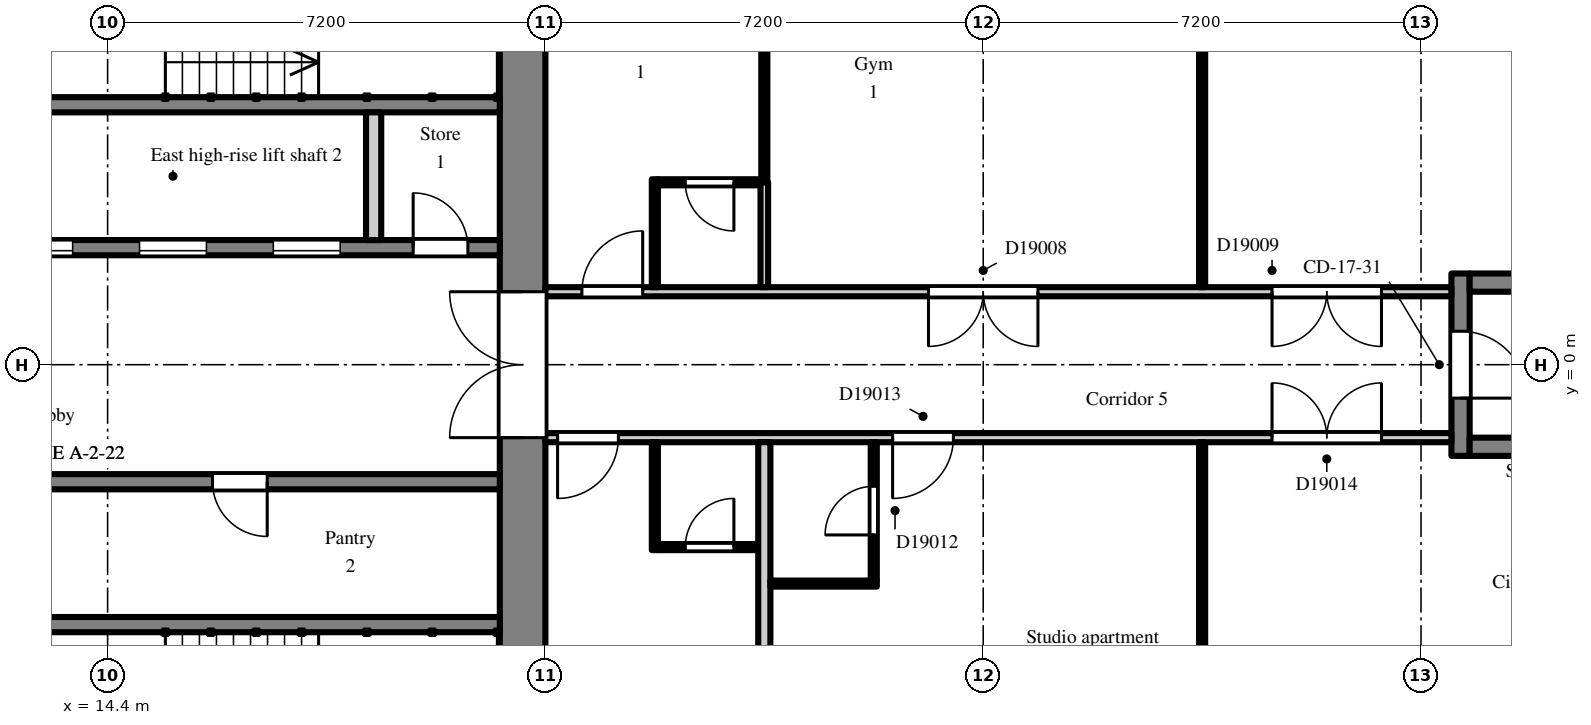
"""IFC4 building model, lengths in metres.
Left out: names, types, materials, properties, quantities, classifications, styles, units other than length and angle.
Written with IfcOpenShell. Run it as: python <this file> out.ifc"""

import sys

from ifc_helpers import new_model, si_unit, direction, frame, frame_2d, origin, place, context, subcontext, project, spatial, rectangle, extrude, element, fill, save


model = new_model("IFC4")
c1 = context("Model", 3, precision=1e-05, world=origin(), true_north=direction((0.0, 1.0)))
c2 = subcontext(c1, "Body", "Model", "MODEL_VIEW")
j1 = project(units=[si_unit("LENGTHUNIT", "METRE"), si_unit("PLANEANGLEUNIT", "RADIAN")], contexts=[c1])
p1 = place(None, origin())
s1 = spatial("IfcSite", under=j1, at=p1, CompositionType="ELEMENT")
p2 = place(p1, origin())
s2 = spatial("IfcBuilding", under=s1, at=p2, CompositionType="ELEMENT")
p3 = place(p2, frame((0.0, 0.0, 129.3)))
s3 = spatial("IfcBuildingStorey", under=s2, at=p3, CompositionType="ELEMENT", Elevation=129.3)
p4 = place(p3, frame((21.225, -7.2, 0.0), z_axis=(0.0, 0.0, 1.0), x_axis=(0.0, 1.0, 0.0)))
e1 = element("IfcWall", 1, at=p4, inside=s3, PredefinedType="SHEAR", context=c2, shape_type="SweptSolid", body=[
    extrude(rectangle(XDim=14.4, YDim=0.75, at=frame_2d((7.2, 0.0))), origin(), (0.0, 0.0, 1.0), 2.6),
])
p5 = place(p4, frame((6.0, 0.0, 0.0)))
e2 = element("IfcOpeningElement", 2, at=p5, cuts=e1, PredefinedType="OPENING", context=c2, shape_type="SweptSolid", body=[
    extrude(rectangle(XDim=2.4, YDim=2.2, at=frame_2d((1.2, 1.1))), frame((0.0, 0.385, 0.0), z_axis=(0.0, -1.0, 0.0), x_axis=(1.0, 0.0, 0.0)), (0.0, 0.0, 1.0), 0.77),
])
p6 = place(p3, frame((7.9, 1.925, 0.0), z_axis=(0.0, 0.0, 1.0), x_axis=(1.0, 0.0, 0.0)))
e3 = element("IfcWall", 3, at=p6, inside=s3, PredefinedType="SHEAR", context=c2, shape_type="SweptSolid", body=[
    extrude(rectangle(XDim=12.95, YDim=0.25, at=frame_2d((6.475, 0.0))), origin(), (0.0, 0.0, 1.0), 2.6),
])
p7 = place(p6, frame((4.825, 0.0, 0.0)))
e4 = element("IfcOpeningElement", 4, at=p7, cuts=e3, PredefinedType="OPENING", context=c2, shape_type="SweptSolid", body=[
    extrude(rectangle(XDim=1.1, YDim=2.1, at=frame_2d((0.55, 1.05))), frame((0.0, 0.135, 0.0), z_axis=(0.0, -1.0, 0.0), x_axis=(1.0, 0.0, 0.0)), (0.0, 0.0, 1.0), 0.27),
])
p8 = place(p6, frame((7.025, 0.0, 0.0)))
e5 = element("IfcOpeningElement", 5, at=p8, cuts=e3, PredefinedType="OPENING", context=c2, shape_type="SweptSolid", body=[
    extrude(rectangle(XDim=1.1, YDim=2.1, at=frame_2d((0.55, 1.05))), frame((0.0, 0.135, 0.0), z_axis=(0.0, -1.0, 0.0), x_axis=(1.0, 0.0, 0.0)), (0.0, 0.0, 1.0), 0.27),
])
p9 = place(p6, frame((9.225, 0.0, 0.0)))
e6 = element("IfcOpeningElement", 6, at=p9, cuts=e3, PredefinedType="OPENING", context=c2, shape_type="SweptSolid", body=[
    extrude(rectangle(XDim=1.1, YDim=2.1, at=frame_2d((0.55, 1.05))), frame((0.0, 0.135, 0.0), z_axis=(0.0, -1.0, 0.0), x_axis=(1.0, 0.0, 0.0)), (0.0, 0.0, 1.0), 0.27),
])
p10 = place(p6, frame((0.525, 0.0, 0.0)))
e7 = element("IfcOpeningElement", 7, at=p10, cuts=e3, PredefinedType="OPENING", context=c2, shape_type="SweptSolid", body=[
    extrude(rectangle(XDim=0.9, YDim=2.1, at=frame_2d((0.45, 1.05))), frame((0.0, 0.135, 0.0), z_axis=(0.0, -1.0, 0.0), x_axis=(1.0, 0.0, 0.0)), (0.0, 0.0, 1.0), 0.27),
])
p11 = place(p6, frame((2.625, 0.0, 0.0)))
e8 = element("IfcOpeningElement", 8, at=p11, cuts=e3, PredefinedType="OPENING", context=c2, shape_type="SweptSolid", body=[
    extrude(rectangle(XDim=1.1, YDim=2.1, at=frame_2d((0.55, 1.05))), frame((0.0, 0.135, 0.0), z_axis=(0.0, -1.0, 0.0), x_axis=(1.0, 0.0, 0.0)), (0.0, 0.0, 1.0), 0.27),
])
p12 = place(p6, frame((11.525, 0.0, 0.0)))
e9 = element("IfcOpeningElement", 9, at=p12, cuts=e3, PredefinedType="OPENING", context=c2, shape_type="SweptSolid", body=[
    extrude(rectangle(XDim=0.9, YDim=2.1, at=frame_2d((0.45, 1.05))), frame((0.0, 0.135, 0.0), z_axis=(0.0, -1.0, 0.0), x_axis=(1.0, 0.0, 0.0)), (0.0, 0.0, 1.0), 0.27),
])
p13 = place(p3, frame((12.3, 4.275, 0.0), z_axis=(0.0, 0.0, 1.0), x_axis=(1.0, 0.0, 0.0)))
e10 = element("IfcWall", 10, at=p13, inside=s3, PredefinedType="SHEAR", context=c2, shape_type="SweptSolid", body=[
    extrude(rectangle(XDim=8.55, YDim=0.25, at=frame_2d((4.275, 0.0))), origin(), (0.0, 0.0, 1.0), 2.6),
])
p14 = place(p3, frame((18.775, 2.05, 0.0), z_axis=(0.0, 0.0, 1.0), x_axis=(0.0, 1.0, 0.0)))
e11 = element("IfcWall", 11, at=p14, inside=s3, PredefinedType="PARTITIONING", context=c2, shape_type="SweptSolid", body=[
    extrude(rectangle(XDim=2.1, YDim=0.25, at=frame_2d((1.05, 0.0))), origin(), (0.0, 0.0, 1.0), 2.6),
])
p15 = place(p3, frame((7.9, -1.925, 0.0), z_axis=(0.0, 0.0, 1.0), x_axis=(1.0, 0.0, 0.0)))
e12 = element("IfcWall", 12, at=p15, inside=s3, PredefinedType="SHEAR", context=c2, shape_type="SweptSolid", body=[
    extrude(rectangle(XDim=12.95, YDim=0.25, at=frame_2d((6.475, 0.0))), origin(), (0.0, 0.0, 1.0), 2.6),
])
p16 = place(p15, frame((0.525, 0.0, 0.0)))
e13 = element("IfcOpeningElement", 13, at=p16, cuts=e12, PredefinedType="OPENING", context=c2, shape_type="SweptSolid", body=[
    extrude(rectangle(XDim=0.9, YDim=2.1, at=frame_2d((0.45, 1.05))), frame((0.0, 0.135, 0.0), z_axis=(0.0, -1.0, 0.0), x_axis=(1.0, 0.0, 0.0)), (0.0, 0.0, 1.0), 0.27),
])
p17 = place(p15, frame((2.625, 0.0, 0.0)))
e14 = element("IfcOpeningElement", 14, at=p17, cuts=e12, PredefinedType="OPENING", context=c2, shape_type="SweptSolid", body=[
    extrude(rectangle(XDim=1.1, YDim=2.1, at=frame_2d((0.55, 1.05))), frame((0.0, 0.135, 0.0), z_axis=(0.0, -1.0, 0.0), x_axis=(1.0, 0.0, 0.0)), (0.0, 0.0, 1.0), 0.27),
])
p18 = place(p15, frame((8.225, 0.0, 0.0)))
e15 = element("IfcOpeningElement", 15, at=p18, cuts=e12, PredefinedType="OPENING", context=c2, shape_type="SweptSolid", body=[
    extrude(rectangle(XDim=0.9, YDim=2.1, at=frame_2d((0.45, 1.05))), frame((0.0, 0.135, 0.0), z_axis=(0.0, -1.0, 0.0), x_axis=(1.0, 0.0, 0.0)), (0.0, 0.0, 1.0), 0.27),
])
p19 = place(p3, frame((12.3, -4.275, 0.0), z_axis=(0.0, 0.0, 1.0), x_axis=(1.0, 0.0, 0.0)))
e16 = element("IfcWall", 16, at=p19, inside=s3, PredefinedType="SHEAR", context=c2, shape_type="SweptSolid", body=[
    extrude(rectangle(XDim=8.55, YDim=0.25, at=frame_2d((4.275, 0.0))), origin(), (0.0, 0.0, 1.0), 2.6),
])
p20 = place(p3, frame((36.65, -1.5, 0.0), z_axis=(0.0, 0.0, 1.0), x_axis=(0.0, 1.0, 0.0)))
e17 = element("IfcWall", 17, at=p20, inside=s3, PredefinedType="SHEAR", context=c2, shape_type="SweptSolid", body=[
    extrude(rectangle(XDim=3.0, YDim=0.3, at=frame_2d((1.5, 0.0))), origin(), (0.0, 0.0, 1.0), 2.6),
])
p21 = place(p20, frame((0.95, 0.0, 0.0)))
e18 = element("IfcOpeningElement", 18, at=p21, cuts=e17, PredefinedType="OPENING", context=c2, shape_type="SweptSolid", body=[
    extrude(rectangle(XDim=1.1, YDim=2.1, at=frame_2d((0.55, 1.05))), frame((0.0, 0.16, 0.0), z_axis=(0.0, -1.0, 0.0), x_axis=(1.0, 0.0, 0.0)), (0.0, 0.0, 1.0), 0.32),
])
for number, where, z_axis, x_axis in (
    (19, (36.8, -1.35, 0.0), (0.0, 0.0, 1.0), (1.0, 0.0, 0.0)),
    (20, (36.8, 1.35, 0.0), (0.0, 0.0, 1.0), (1.0, 0.0, 0.0)),
):
    element("IfcWall", number, at=place(p3, frame(where, z_axis=z_axis, x_axis=x_axis)), inside=s3, PredefinedType="SHEAR", context=c2, shape_type="SweptSolid", body=[
        extrude(rectangle(XDim=5.8, YDim=0.3, at=frame_2d((2.9, 0.0))), origin(), (0.0, 0.0, 1.0), 2.6),
    ])
p22 = place(p3, frame((21.6, -1.2, 0.0), z_axis=(0.0, 0.0, 1.0), x_axis=(1.0, 0.0, 0.0)))
e21 = element("IfcWall", 21, at=p22, inside=s3, PredefinedType="PARTITIONING", context=c2, shape_type="SweptSolid", body=[
    extrude(rectangle(XDim=14.9, YDim=0.15, at=frame_2d((7.45, 0.0))), origin(), (0.0, 0.0, 1.0), 2.6),
])
p23 = place(p22, frame((0.2, 0.0, 0.0)))
e22 = element("IfcOpeningElement", 22, at=p23, cuts=e21, PredefinedType="OPENING", context=c2, shape_type="SweptSolid", body=[
    extrude(rectangle(XDim=1.0, YDim=2.1, at=frame_2d((0.5, 1.05))), frame((0.0, 0.085, 0.0), z_axis=(0.0, -1.0, 0.0), x_axis=(1.0, 0.0, 0.0)), (0.0, 0.0, 1.0), 0.17),
])
p24 = place(p22, frame((5.71, 0.0, 0.0)))
e23 = element("IfcOpeningElement", 23, at=p24, cuts=e21, PredefinedType="OPENING", context=c2, shape_type="SweptSolid", body=[
    extrude(rectangle(XDim=1.0, YDim=2.1, at=frame_2d((0.5, 1.05))), frame((0.0, 0.085, 0.0), z_axis=(0.0, -1.0, 0.0), x_axis=(1.0, 0.0, 0.0)), (0.0, 0.0, 1.0), 0.17),
])
p25 = place(p22, frame((11.95, 0.0, 0.0)))
e24 = element("IfcOpeningElement", 24, at=p25, cuts=e21, PredefinedType="OPENING", context=c2, shape_type="SweptSolid", body=[
    extrude(rectangle(XDim=1.8, YDim=2.1, at=frame_2d((0.9, 1.05))), frame((0.0, 0.085, 0.0), z_axis=(0.0, -1.0, 0.0), x_axis=(1.0, 0.0, 0.0)), (0.0, 0.0, 1.0), 0.17),
])
p26 = place(p3, frame((21.6, 1.2, 0.0), z_axis=(0.0, 0.0, 1.0), x_axis=(1.0, 0.0, 0.0)))
e25 = element("IfcWall", 25, at=p26, inside=s3, PredefinedType="PARTITIONING", context=c2, shape_type="SweptSolid", body=[
    extrude(rectangle(XDim=14.9, YDim=0.15, at=frame_2d((7.45, 0.0))), origin(), (0.0, 0.0, 1.0), 2.6),
])
p27 = place(p26, frame((0.6, 0.0, 0.0)))
e26 = element("IfcOpeningElement", 26, at=p27, cuts=e25, PredefinedType="OPENING", context=c2, shape_type="SweptSolid", body=[
    extrude(rectangle(XDim=1.0, YDim=2.1, at=frame_2d((0.5, 1.05))), frame((0.0, 0.085, 0.0), z_axis=(0.0, -1.0, 0.0), x_axis=(1.0, 0.0, 0.0)), (0.0, 0.0, 1.0), 0.17),
])
p28 = place(p26, frame((6.3, 0.0, 0.0)))
e27 = element("IfcOpeningElement", 27, at=p28, cuts=e25, PredefinedType="OPENING", context=c2, shape_type="SweptSolid", body=[
    extrude(rectangle(XDim=1.8, YDim=2.1, at=frame_2d((0.9, 1.05))), frame((0.0, 0.085, 0.0), z_axis=(0.0, -1.0, 0.0), x_axis=(1.0, 0.0, 0.0)), (0.0, 0.0, 1.0), 0.17),
])
p29 = place(p26, frame((11.95, 0.0, 0.0)))
e28 = element("IfcOpeningElement", 28, at=p29, cuts=e25, PredefinedType="OPENING", context=c2, shape_type="SweptSolid", body=[
    extrude(rectangle(XDim=1.8, YDim=2.1, at=frame_2d((0.9, 1.05))), frame((0.0, 0.085, 0.0), z_axis=(0.0, -1.0, 0.0), x_axis=(1.0, 0.0, 0.0)), (0.0, 0.0, 1.0), 0.17),
])
p30 = place(p3, frame((23.4, -3.05, 0.0), z_axis=(0.0, 0.0, 1.0), x_axis=(0.0, 1.0, 0.0)))
e29 = element("IfcWall", 29, at=p30, inside=s3, PredefinedType="PARTITIONING", context=c2, shape_type="SweptSolid", body=[
    extrude(rectangle(XDim=1.775, YDim=0.1, at=frame_2d((0.888, 0.0))), origin(), (0.0, 0.0, 1.0), 2.6),
])
p31 = place(p3, frame((23.45, -3.0, 0.0), z_axis=(0.0, 0.0, 1.0), x_axis=(1.0, 0.0, 0.0)))
e30 = element("IfcWall", 30, at=p31, inside=s3, PredefinedType="PARTITIONING", context=c2, shape_type="SweptSolid", body=[
    extrude(rectangle(XDim=1.65, YDim=0.1, at=frame_2d((0.825, 0.0))), origin(), (0.0, 0.0, 1.0), 2.6),
])
p32 = place(p31, frame((0.45, 0.0, 0.0)))
e31 = element("IfcOpeningElement", 31, at=p32, cuts=e30, PredefinedType="OPENING", context=c2, shape_type="SweptSolid", body=[
    extrude(rectangle(XDim=0.8, YDim=2.1, at=frame_2d((0.4, 1.05))), frame((0.0, 0.06, 0.0), z_axis=(0.0, -1.0, 0.0), x_axis=(1.0, 0.0, 0.0)), (0.0, 0.0, 1.0), 0.12),
])
p33 = place(p3, frame((23.4, 1.275, 0.0), z_axis=(0.0, 0.0, 1.0), x_axis=(0.0, 1.0, 0.0)))
e32 = element("IfcWall", 32, at=p33, inside=s3, PredefinedType="PARTITIONING", context=c2, shape_type="SweptSolid", body=[
    extrude(rectangle(XDim=1.775, YDim=0.1, at=frame_2d((0.888, 0.0))), origin(), (0.0, 0.0, 1.0), 2.6),
])
p34 = place(p3, frame((23.45, 3.0, 0.0), z_axis=(0.0, 0.0, 1.0), x_axis=(1.0, 0.0, 0.0)))
e33 = element("IfcWall", 33, at=p34, inside=s3, PredefinedType="PARTITIONING", context=c2, shape_type="SweptSolid", body=[
    extrude(rectangle(XDim=1.688, YDim=0.1, at=frame_2d((0.844, 0.0))), origin(), (0.0, 0.0, 1.0), 2.6),
])
p35 = place(p34, frame((0.45, 0.0, 0.0)))
e34 = element("IfcOpeningElement", 34, at=p35, cuts=e33, PredefinedType="OPENING", context=c2, shape_type="SweptSolid", body=[
    extrude(rectangle(XDim=0.8, YDim=2.1, at=frame_2d((0.4, 1.05))), frame((0.0, 0.06, 0.0), z_axis=(0.0, -1.0, 0.0), x_axis=(1.0, 0.0, 0.0)), (0.0, 0.0, 1.0), 0.12),
])
p36 = place(p3, frame((25.2, -6.9, 0.0), z_axis=(0.0, 0.0, 1.0), x_axis=(0.0, 1.0, 0.0)))
e35 = element("IfcWall", 35, at=p36, inside=s3, PredefinedType="PARTITIONING", context=c2, shape_type="SweptSolid", body=[
    extrude(rectangle(XDim=5.625, YDim=0.2, at=frame_2d((2.812, 0.0))), origin(), (0.0, 0.0, 1.0), 2.6),
])
p37 = place(p3, frame((25.3, -3.6, 0.0), z_axis=(0.0, 0.0, 1.0), x_axis=(1.0, 0.0, 0.0)))
e36 = element("IfcWall", 36, at=p37, inside=s3, PredefinedType="PARTITIONING", context=c2, shape_type="SweptSolid", body=[
    extrude(rectangle(XDim=1.75, YDim=0.1, at=frame_2d((0.875, 0.0))), origin(), (0.0, 0.0, 1.0), 2.6),
])
p38 = place(p3, frame((25.2, 1.275, 0.0), z_axis=(0.0, 0.0, 1.0), x_axis=(0.0, 1.0, 0.0)))
e37 = element("IfcWall", 37, at=p38, inside=s3, PredefinedType="PARTITIONING", context=c2, shape_type="SweptSolid", body=[
    extrude(rectangle(XDim=1.725, YDim=0.125, at=frame_2d((0.863, 0.0))), origin(), (0.0, 0.0, 1.0), 2.6),
])
p39 = place(p3, frame((25.2, 3.0, 0.0), z_axis=(0.0, 0.0, 1.0), x_axis=(0.0, 1.0, 0.0)))
e38 = element("IfcWall", 38, at=p39, inside=s3, PredefinedType="PARTITIONING", context=c2, shape_type="SweptSolid", body=[
    extrude(rectangle(XDim=3.9, YDim=0.1, at=frame_2d((1.95, 0.0))), origin(), (0.0, 0.0, 1.0), 2.6),
])
p40 = place(p3, frame((27.0, -3.55, 0.0), z_axis=(0.0, 0.0, 1.0), x_axis=(0.0, 1.0, 0.0)))
e39 = element("IfcWall", 39, at=p40, inside=s3, PredefinedType="PARTITIONING", context=c2, shape_type="SweptSolid", body=[
    extrude(rectangle(XDim=2.275, YDim=0.1, at=frame_2d((1.138, 0.0))), origin(), (0.0, 0.0, 1.0), 2.6),
])
p41 = place(p40, frame((0.75, 0.0, 0.0)))
e40 = element("IfcOpeningElement", 40, at=p41, cuts=e39, PredefinedType="OPENING", context=c2, shape_type="SweptSolid", body=[
    extrude(rectangle(XDim=0.8, YDim=2.1, at=frame_2d((0.4, 1.05))), frame((0.0, 0.06, 0.0), z_axis=(0.0, -1.0, 0.0), x_axis=(1.0, 0.0, 0.0)), (0.0, 0.0, 1.0), 0.12),
])
for number, where, z_axis, x_axis in (
    (41, (32.4, -6.9, 0.0), (0.0, 0.0, 1.0), (0.0, 1.0, 0.0)),
    (42, (32.4, 1.275, 0.0), (0.0, 0.0, 1.0), (0.0, 1.0, 0.0)),
):
    element("IfcWall", number, at=place(p3, frame(where, z_axis=z_axis, x_axis=x_axis)), inside=s3, PredefinedType="PARTITIONING", context=c2, shape_type="SweptSolid", body=[
        extrude(rectangle(XDim=5.625, YDim=0.1, at=frame_2d((2.812, 0.0))), origin(), (0.0, 0.0, 1.0), 2.6),
    ])
p42 = place(p7, origin())
e43 = element("IfcDoor", 43, at=p42, inside=s3, OperationType="SLIDING_TO_LEFT", PredefinedType="DOOR", context=c2, shape_type="SweptSolid", body=[
    extrude(rectangle(XDim=1.1, YDim=2.1, at=frame_2d((0.55, 1.05))), frame((0.0, 0.025, 0.0), z_axis=(0.0, -1.0, 0.0), x_axis=(1.0, 0.0, 0.0)), (0.0, 0.0, 1.0), 0.05),
])
fill(e4, e43)
p43 = place(p8, origin())
e44 = element("IfcDoor", 44, at=p43, inside=s3, OperationType="SLIDING_TO_LEFT", PredefinedType="DOOR", context=c2, shape_type="SweptSolid", body=[
    extrude(rectangle(XDim=1.1, YDim=2.1, at=frame_2d((0.55, 1.05))), frame((0.0, 0.025, 0.0), z_axis=(0.0, -1.0, 0.0), x_axis=(1.0, 0.0, 0.0)), (0.0, 0.0, 1.0), 0.05),
])
fill(e5, e44)
p44 = place(p9, origin())
e45 = element("IfcDoor", 45, at=p44, inside=s3, OperationType="SLIDING_TO_LEFT", PredefinedType="DOOR", context=c2, shape_type="SweptSolid", body=[
    extrude(rectangle(XDim=1.1, YDim=2.1, at=frame_2d((0.55, 1.05))), frame((0.0, 0.025, 0.0), z_axis=(0.0, -1.0, 0.0), x_axis=(1.0, 0.0, 0.0)), (0.0, 0.0, 1.0), 0.05),
])
fill(e6, e45)
p45 = place(p5, origin())
e46 = element("IfcDoor", 46, at=p45, inside=s3, OperationType="DOUBLE_DOOR_DOUBLE_SWING", PredefinedType="DOOR", context=c2, shape_type="SweptSolid", body=[
    extrude(rectangle(XDim=2.4, YDim=2.2, at=frame_2d((1.2, 1.1))), frame((0.0, 0.025, 0.0), z_axis=(0.0, -1.0, 0.0), x_axis=(1.0, 0.0, 0.0)), (0.0, 0.0, 1.0), 0.05),
])
fill(e2, e46)
p46 = place(p12, origin())
e47 = element("IfcDoor", 47, at=p46, inside=s3, OperationType="SINGLE_SWING_LEFT", PredefinedType="DOOR", context=c2, shape_type="SweptSolid", body=[
    extrude(rectangle(XDim=0.9, YDim=2.1, at=frame_2d((0.45, 1.05))), frame((0.0, 0.025, 0.0), z_axis=(0.0, -1.0, 0.0), x_axis=(1.0, 0.0, 0.0)), (0.0, 0.0, 1.0), 0.05),
])
fill(e9, e47)
p47 = place(p18, frame((0.9, 0.0, 0.0), z_axis=(0.0, 0.0, 1.0), x_axis=(-1.0, 0.0, 0.0)))
e48 = element("IfcDoor", 48, at=p47, inside=s3, OperationType="SINGLE_SWING_LEFT", PredefinedType="DOOR", context=c2, shape_type="SweptSolid", body=[
    extrude(rectangle(XDim=0.9, YDim=2.1, at=frame_2d((0.45, 1.05))), frame((0.0, 0.025, 0.0), z_axis=(0.0, -1.0, 0.0), x_axis=(1.0, 0.0, 0.0)), (0.0, 0.0, 1.0), 0.05),
])
fill(e15, e48)
p48 = place(p21, frame((1.1, 0.0, 0.0), z_axis=(0.0, 0.0, 1.0), x_axis=(-1.0, 0.0, 0.0)))
e49 = element("IfcDoor", 49, at=p48, inside=s3, OperationType="SINGLE_SWING_RIGHT", PredefinedType="DOOR", context=c2, shape_type="SweptSolid", body=[
    extrude(rectangle(XDim=1.1, YDim=2.1, at=frame_2d((0.55, 1.05))), frame((0.0, 0.025, 0.0), z_axis=(0.0, -1.0, 0.0), x_axis=(1.0, 0.0, 0.0)), (0.0, 0.0, 1.0), 0.05),
])
fill(e18, e49)
p49 = place(p35, frame((0.8, 0.0, 0.0), z_axis=(0.0, 0.0, 1.0), x_axis=(-1.0, 0.0, 0.0)))
e50 = element("IfcDoor", 50, at=p49, inside=s3, OperationType="SINGLE_SWING_LEFT", PredefinedType="DOOR", context=c2, shape_type="SweptSolid", body=[
    extrude(rectangle(XDim=0.8, YDim=2.1, at=frame_2d((0.4, 1.05))), frame((0.0, 0.025, 0.0), z_axis=(0.0, -1.0, 0.0), x_axis=(1.0, 0.0, 0.0)), (0.0, 0.0, 1.0), 0.05),
])
fill(e34, e50)
p50 = place(p27, origin())
e51 = element("IfcDoor", 51, at=p50, inside=s3, OperationType="SINGLE_SWING_RIGHT", PredefinedType="DOOR", context=c2, shape_type="SweptSolid", body=[
    extrude(rectangle(XDim=1.0, YDim=2.1, at=frame_2d((0.5, 1.05))), frame((0.0, 0.025, 0.0), z_axis=(0.0, -1.0, 0.0), x_axis=(1.0, 0.0, 0.0)), (0.0, 0.0, 1.0), 0.05),
])
fill(e26, e51)
p51 = place(p28, frame((1.8, 0.0, 0.0), z_axis=(0.0, 0.0, 1.0), x_axis=(-1.0, 0.0, 0.0)))
e52 = element("IfcDoor", 52, at=p51, inside=s3, OperationType="DOUBLE_DOOR_DOUBLE_SWING", PredefinedType="DOOR", context=c2, shape_type="SweptSolid", body=[
    extrude(rectangle(XDim=1.8, YDim=2.1, at=frame_2d((0.9, 1.05))), frame((0.0, 0.025, 0.0), z_axis=(0.0, -1.0, 0.0), x_axis=(1.0, 0.0, 0.0)), (0.0, 0.0, 1.0), 0.05),
])
fill(e27, e52)
p52 = place(p29, frame((1.8, 0.0, 0.0), z_axis=(0.0, 0.0, 1.0), x_axis=(-1.0, 0.0, 0.0)))
e53 = element("IfcDoor", 53, at=p52, inside=s3, OperationType="DOUBLE_DOOR_DOUBLE_SWING", PredefinedType="DOOR", context=c2, shape_type="SweptSolid", body=[
    extrude(rectangle(XDim=1.8, YDim=2.1, at=frame_2d((0.9, 1.05))), frame((0.0, 0.025, 0.0), z_axis=(0.0, -1.0, 0.0), x_axis=(1.0, 0.0, 0.0)), (0.0, 0.0, 1.0), 0.05),
])
fill(e28, e53)
p53 = place(p32, origin())
e54 = element("IfcDoor", 54, at=p53, inside=s3, OperationType="SINGLE_SWING_RIGHT", PredefinedType="DOOR", context=c2, shape_type="SweptSolid", body=[
    extrude(rectangle(XDim=0.8, YDim=2.1, at=frame_2d((0.4, 1.05))), frame((0.0, 0.025, 0.0), z_axis=(0.0, -1.0, 0.0), x_axis=(1.0, 0.0, 0.0)), (0.0, 0.0, 1.0), 0.05),
])
fill(e31, e54)
p54 = place(p23, frame((1.0, 0.0, 0.0), z_axis=(0.0, 0.0, 1.0), x_axis=(-1.0, 0.0, 0.0)))
e55 = element("IfcDoor", 55, at=p54, inside=s3, OperationType="SINGLE_SWING_RIGHT", PredefinedType="DOOR", context=c2, shape_type="SweptSolid", body=[
    extrude(rectangle(XDim=1.0, YDim=2.1, at=frame_2d((0.5, 1.05))), frame((0.0, 0.025, 0.0), z_axis=(0.0, -1.0, 0.0), x_axis=(1.0, 0.0, 0.0)), (0.0, 0.0, 1.0), 0.05),
])
fill(e22, e55)
p55 = place(p41, origin())
e56 = element("IfcDoor", 56, at=p55, inside=s3, OperationType="SINGLE_SWING_LEFT", PredefinedType="DOOR", context=c2, shape_type="SweptSolid", body=[
    extrude(rectangle(XDim=0.8, YDim=2.1, at=frame_2d((0.4, 1.05))), frame((0.0, 0.025, 0.0), z_axis=(0.0, -1.0, 0.0), x_axis=(1.0, 0.0, 0.0)), (0.0, 0.0, 1.0), 0.05),
])
fill(e40, e56)
p56 = place(p24, frame((1.0, 0.0, 0.0), z_axis=(0.0, 0.0, 1.0), x_axis=(-1.0, 0.0, 0.0)))
e57 = element("IfcDoor", 57, at=p56, inside=s3, OperationType="SINGLE_SWING_RIGHT", PredefinedType="DOOR", context=c2, shape_type="SweptSolid", body=[
    extrude(rectangle(XDim=1.0, YDim=2.1, at=frame_2d((0.5, 1.05))), frame((0.0, 0.025, 0.0), z_axis=(0.0, -1.0, 0.0), x_axis=(1.0, 0.0, 0.0)), (0.0, 0.0, 1.0), 0.05),
])
fill(e23, e57)
p57 = place(p25, origin())
e58 = element("IfcDoor", 58, at=p57, inside=s3, OperationType="DOUBLE_DOOR_DOUBLE_SWING", PredefinedType="DOOR", context=c2, shape_type="SweptSolid", body=[
    extrude(rectangle(XDim=1.8, YDim=2.1, at=frame_2d((0.9, 1.05))), frame((0.0, 0.025, 0.0), z_axis=(0.0, -1.0, 0.0), x_axis=(1.0, 0.0, 0.0)), (0.0, 0.0, 1.0), 0.05),
])
fill(e24, e58)
save(model, sys.argv[1])
